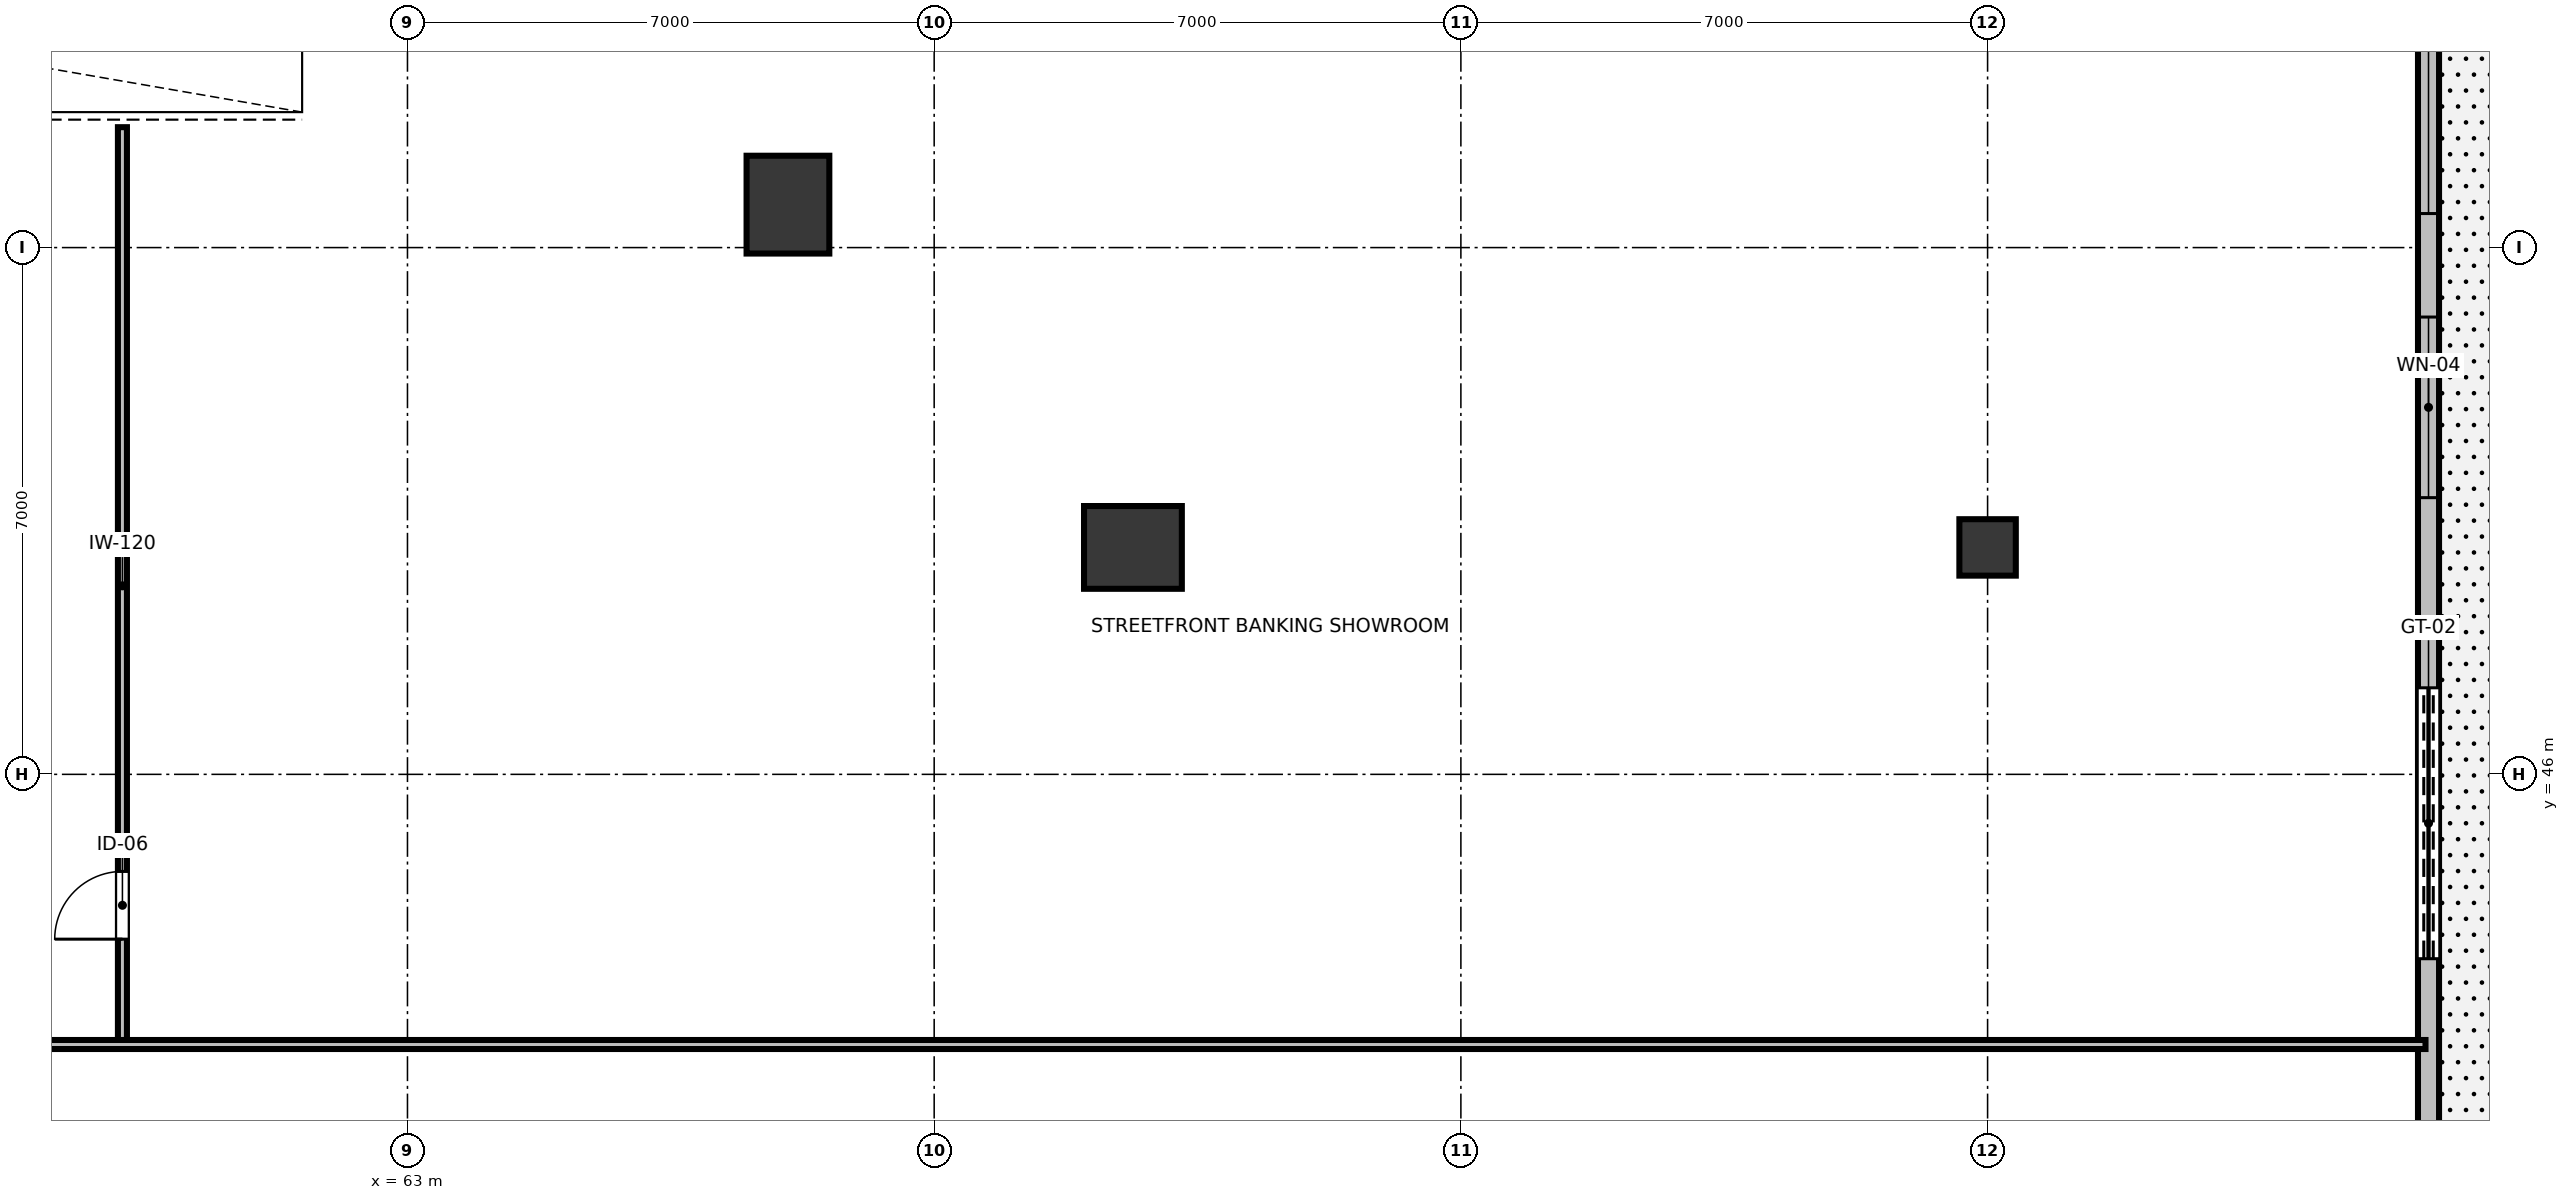
"""IFC4 building model, lengths in metres.
Left out: names, types, materials, properties, quantities, classifications, styles, units other than length and angle.
Written with IfcOpenShell. Run it as: python <this file> out.ifc"""

import sys

from ifc_helpers import new_model, si_unit, direction, frame, frame_2d, origin, origin_2d, place, context, subcontext, project, spatial, rectangle, hollow_rectangle, extrude, element, fill, save


model = new_model("IFC4")
c1 = context("Model", 3, precision=1e-05, world=origin(), true_north=direction((0.0, 1.0)))
c2 = subcontext(c1, "Body", "Model", "MODEL_VIEW")
j1 = project(units=[si_unit("LENGTHUNIT", "METRE"), si_unit("PLANEANGLEUNIT", "RADIAN")], contexts=[c1])
p1 = place(None, origin())
s1 = spatial("IfcSite", under=j1, at=p1, CompositionType="ELEMENT")
p2 = place(p1, origin())
s2 = spatial("IfcBuilding", under=s1, at=p2, CompositionType="ELEMENT")
p3 = place(p2, origin())
s3 = spatial("IfcBuildingStorey", under=s2, at=p3, CompositionType="ELEMENT", Elevation=0.0)
for number, where, z_axis, x_axis in (
    (1, (72.642, 49.016, 0.0), (0.0, 0.0, 1.0), (0.0, 1.0, 0.0)),
    (2, (68.057, 53.571, 0.0), (0.0, 0.0, 1.0), (1.0, 0.0, 0.0)),
):
    element("IfcColumn", number, at=place(p3, frame(where, z_axis=z_axis, x_axis=x_axis)), inside=s3, PredefinedType="COLUMN", context=c2, shape_type="SweptSolid", body=[
        extrude(hollow_rectangle(XDim=1.1, YDim=1.3, WallThickness=0.07, at=origin_2d()), origin(), (0.0, 0.0, 1.0), 4.718),
    ])
p4 = place(p3, frame((89.86, 6.36, 0.0), z_axis=(0.0, 0.0, 1.0), x_axis=(0.0, 1.0, 0.0)))
e3 = element("IfcWall", 3, at=p4, inside=s3, PredefinedType="STANDARD", context=c2, shape_type="SweptSolid", body=[
    extrude(rectangle(XDim=51.28, YDim=0.28, at=frame_2d((25.64, 0.0))), origin(), (0.0, 0.0, 1.0), 4.72),
])
p5 = place(p4, frame((19.49, 0.0, 0.0)))
e4 = element("IfcOpeningElement", 4, at=p5, cuts=e3, PredefinedType="OPENING", context=c2, shape_type="SweptSolid", body=[
    extrude(rectangle(XDim=1.8, YDim=2.4, at=frame_2d((0.9, 1.2))), frame((0.0, 0.15, 0.0), z_axis=(0.0, -1.0, 0.0), x_axis=(1.0, 0.0, 0.0)), (0.0, 0.0, 1.0), 0.3),
])
p6 = place(p4, frame((37.19, 0.0, 0.0)))
e5 = element("IfcOpeningElement", 5, at=p6, cuts=e3, PredefinedType="OPENING", context=c2, shape_type="SweptSolid", body=[
    extrude(rectangle(XDim=3.6, YDim=3.6, at=frame_2d((1.8, 1.8))), frame((0.0, 0.15, 0.0), z_axis=(0.0, -1.0, 0.0), x_axis=(1.0, 0.0, 0.0)), (0.0, 0.0, 1.0), 0.3),
])
p7 = place(p4, frame((1.788, 0.0, 0.85)))
e6 = element("IfcOpeningElement", 6, at=p7, cuts=e3, PredefinedType="OPENING", context=c2, shape_type="SweptSolid", body=[
    extrude(rectangle(XDim=2.4, YDim=2.4, at=frame_2d((1.2, 1.2))), frame((0.0, 0.15, 0.0), z_axis=(0.0, -1.0, 0.0), x_axis=(1.0, 0.0, 0.0)), (0.0, 0.0, 1.0), 0.3),
])
p8 = place(p4, frame((5.563, 0.0, 0.85)))
e7 = element("IfcOpeningElement", 7, at=p8, cuts=e3, PredefinedType="OPENING", context=c2, shape_type="SweptSolid", body=[
    extrude(rectangle(XDim=2.4, YDim=2.4, at=frame_2d((1.2, 1.2))), frame((0.0, 0.15, 0.0), z_axis=(0.0, -1.0, 0.0), x_axis=(1.0, 0.0, 0.0)), (0.0, 0.0, 1.0), 0.3),
])
p9 = place(p4, frame((9.338, 0.0, 0.85)))
e8 = element("IfcOpeningElement", 8, at=p9, cuts=e3, PredefinedType="OPENING", context=c2, shape_type="SweptSolid", body=[
    extrude(rectangle(XDim=2.4, YDim=2.4, at=frame_2d((1.2, 1.2))), frame((0.0, 0.15, 0.0), z_axis=(0.0, -1.0, 0.0), x_axis=(1.0, 0.0, 0.0)), (0.0, 0.0, 1.0), 0.3),
])
p10 = place(p4, frame((43.317, 0.0, 0.85)))
e9 = element("IfcOpeningElement", 9, at=p10, cuts=e3, PredefinedType="OPENING", context=c2, shape_type="SweptSolid", body=[
    extrude(rectangle(XDim=2.4, YDim=2.4, at=frame_2d((1.2, 1.2))), frame((0.0, 0.15, 0.0), z_axis=(0.0, -1.0, 0.0), x_axis=(1.0, 0.0, 0.0)), (0.0, 0.0, 1.0), 0.3),
])
p11 = place(p4, frame((47.092, 0.0, 0.85)))
e10 = element("IfcOpeningElement", 10, at=p11, cuts=e3, PredefinedType="OPENING", context=c2, shape_type="SweptSolid", body=[
    extrude(rectangle(XDim=2.4, YDim=2.4, at=frame_2d((1.2, 1.2))), frame((0.0, 0.15, 0.0), z_axis=(0.0, -1.0, 0.0), x_axis=(1.0, 0.0, 0.0)), (0.0, 0.0, 1.0), 0.3),
])
p12 = place(p3, frame((59.212, 42.41, 0.0), z_axis=(0.0, 0.0, 1.0), x_axis=(0.0, 1.0, 0.0)))
e11 = element("IfcWall", 11, at=p12, inside=s3, PredefinedType="PARTITIONING", context=c2, shape_type="SweptSolid", body=[
    extrude(rectangle(XDim=12.19, YDim=0.12, at=frame_2d((6.095, 0.0))), origin(), (0.0, 0.0, 1.0), 3.82),
])
p13 = place(p12, frame((1.4, 0.0, 0.0)))
e12 = element("IfcOpeningElement", 12, at=p13, cuts=e11, PredefinedType="OPENING", context=c2, shape_type="SweptSolid", body=[
    extrude(rectangle(XDim=0.9, YDim=2.15, at=frame_2d((0.45, 1.075))), frame((0.0, 0.07, 0.0), z_axis=(0.0, -1.0, 0.0), x_axis=(1.0, 0.0, 0.0)), (0.0, 0.0, 1.0), 0.14),
])
p14 = place(p3, frame((57.35, 42.41, 0.0), z_axis=(0.0, 0.0, 1.0), x_axis=(1.0, 0.0, 0.0)))
e13 = element("IfcWall", 13, at=p14, inside=s3, PredefinedType="PARTITIONING", context=c2, shape_type="SweptSolid", body=[
    extrude(rectangle(XDim=32.47, YDim=0.12, at=frame_2d((16.235, 0.0))), origin(), (0.0, 0.0, 1.0), 3.82),
])
p15 = place(p3, frame((84.0, 49.016, 0.0), z_axis=(0.0, 0.0, 1.0), x_axis=(1.0, 0.0, 0.0)))
e14 = element("IfcColumn", 14, at=p15, inside=s3, PredefinedType="PILASTER", context=c2, shape_type="SweptSolid", body=[
    extrude(rectangle(XDim=0.75, YDim=0.75, at=origin_2d()), origin(), (0.0, 0.0, 1.0), 4.72),
])
p16 = place(p6, origin())
e15 = element("IfcDoor", 15, at=p16, inside=s3, OperationType="ROLLINGUP", PredefinedType="GATE", context=c2, shape_type="SweptSolid", body=[
    extrude(rectangle(XDim=3.6, YDim=3.6, at=frame_2d((1.8, 1.8))), frame((0.0, 0.025, 0.0), z_axis=(0.0, -1.0, 0.0), x_axis=(1.0, 0.0, 0.0)), (0.0, 0.0, 1.0), 0.05),
])
fill(e5, e15)
p17 = place(p10, origin())
e16 = element("IfcWindow", 16, at=p17, inside=s3, PartitioningType="SINGLE_PANEL", PredefinedType="WINDOW", context=c2, shape_type="SweptSolid", body=[
    extrude(rectangle(XDim=2.4, YDim=2.4, at=frame_2d((1.2, 1.2))), frame((0.0, 0.03, 0.0), z_axis=(0.0, -1.0, 0.0), x_axis=(1.0, 0.0, 0.0)), (0.0, 0.0, 1.0), 0.06),
])
fill(e9, e16)
p18 = place(p11, origin())
e17 = element("IfcWindow", 17, at=p18, inside=s3, PartitioningType="SINGLE_PANEL", PredefinedType="WINDOW", context=c2, shape_type="SweptSolid", body=[
    extrude(rectangle(XDim=2.4, YDim=2.4, at=frame_2d((1.2, 1.2))), frame((0.0, 0.03, 0.0), z_axis=(0.0, -1.0, 0.0), x_axis=(1.0, 0.0, 0.0)), (0.0, 0.0, 1.0), 0.06),
])
fill(e10, e17)
p19 = place(p13, origin())
e18 = element("IfcDoor", 18, at=p19, inside=s3, OperationType="SINGLE_SWING_LEFT", PredefinedType="DOOR", context=c2, shape_type="SweptSolid", body=[
    extrude(rectangle(XDim=0.9, YDim=2.15, at=frame_2d((0.45, 1.075))), frame((0.0, 0.025, 0.0), z_axis=(0.0, -1.0, 0.0), x_axis=(1.0, 0.0, 0.0)), (0.0, 0.0, 1.0), 0.05),
])
fill(e12, e18)
save(model, sys.argv[1])
